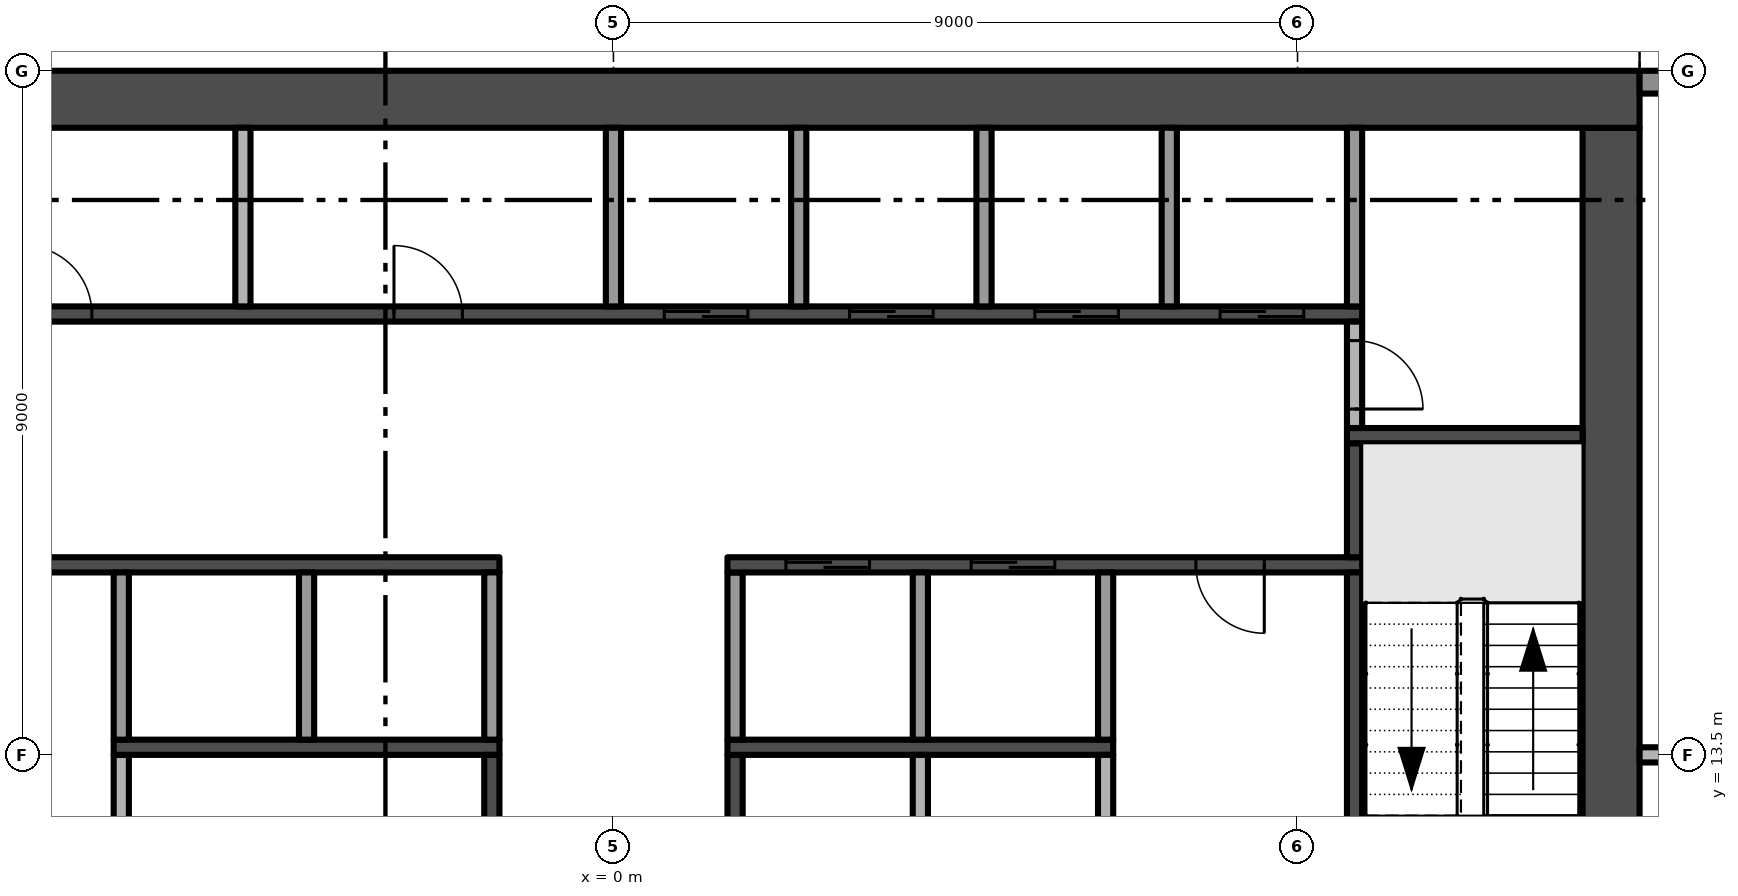
"""IFC4 building model, lengths in metres.
Left out: names, types, materials, properties, quantities, classifications, styles, units other than length and angle.
Written with IfcOpenShell. Run it as: python <this file> out.ifc"""

import sys

from ifc_helpers import new_model, si_unit, direction, frame, frame_2d, origin, place, context, subcontext, project, spatial, rectangle, extrude, element, fill, save


model = new_model("IFC4")
c1 = context("Model", 3, precision=1e-05, world=origin(), true_north=direction((0.0, 1.0)))
c2 = subcontext(c1, "Body", "Model", "MODEL_VIEW")
j1 = project(units=[si_unit("LENGTHUNIT", "METRE"), si_unit("PLANEANGLEUNIT", "RADIAN")], contexts=[c1])
p1 = place(None, origin())
s1 = spatial("IfcSite", under=j1, at=p1, CompositionType="ELEMENT")
p2 = place(p1, origin())
s2 = spatial("IfcBuilding", under=s1, at=p2, CompositionType="ELEMENT")
p3 = place(p2, frame((0.0, 0.0, 136.4)))
s3 = spatial("IfcBuildingStorey", under=s2, at=p3, CompositionType="ELEMENT", Elevation=136.4)
p4 = place(p3, frame((13.125, 5.25, -0.3), z_axis=(0.0, 0.0, 1.0), x_axis=(0.0, 1.0, 0.0)))
e1 = element("IfcWall", 1, at=p4, inside=s3, PredefinedType="SHEAR", context=c2, shape_type="SweptSolid", body=[
    extrude(rectangle(XDim=16.5, YDim=0.75, at=frame_2d((8.25, 0.0))), origin(), (0.0, 0.0, 1.0), 3.8),
])
p5 = place(p4, frame((6.15, 0.0, 0.3)))
e2 = element("IfcOpeningElement", 2, at=p5, cuts=e1, PredefinedType="OPENING", context=c2, shape_type="SweptSolid", body=[
    extrude(rectangle(XDim=1.2, YDim=2.2, at=frame_2d((0.6, 1.1))), frame((0.0, 0.385, 0.0), z_axis=(0.0, -1.0, 0.0), x_axis=(1.0, 0.0, 0.0)), (0.0, 0.0, 1.0), 0.77),
])
p6 = place(p3, frame((13.5, 22.125, -0.3), z_axis=(0.0, 0.0, 1.0), x_axis=(-1.0, 0.0, 0.0)))
e3 = element("IfcWall", 3, at=p6, inside=s3, PredefinedType="SHEAR", context=c2, shape_type="SweptSolid", body=[
    extrude(rectangle(XDim=27.0, YDim=0.75, at=frame_2d((13.5, 0.0))), origin(), (0.0, 0.0, 1.0), 3.8),
])
p7 = place(p3, frame((13.5, 22.35, 0.0), z_axis=(0.0, 0.0, 1.0), x_axis=(1.0, 0.0, 0.0)))
e4 = element("IfcWall", 4, at=p7, inside=s3, PredefinedType="SOLIDWALL", context=c2, shape_type="SweptSolid", body=[
    extrude(rectangle(XDim=3.3, YDim=0.3, at=frame_2d((1.65, 0.0))), origin(), (0.0, 0.0, 1.0), 3.5),
])
p8 = place(p7, frame((2.05, 0.0, 0.45)))
e5 = element("IfcOpeningElement", 5, at=p8, cuts=e4, PredefinedType="OPENING", context=c2, shape_type="SweptSolid", body=[
    extrude(rectangle(XDim=0.95, YDim=2.65, at=frame_2d((0.475, 1.325))), frame((0.0, 0.16, 0.0), z_axis=(0.0, -1.0, 0.0), x_axis=(1.0, 0.0, 0.0)), (0.0, 0.0, 1.0), 0.32),
])
p9 = place(p7, frame((0.7, 0.0, 0.0)))
e6 = element("IfcOpeningElement", 6, at=p9, cuts=e4, PredefinedType="OPENING", context=c2, shape_type="SweptSolid", body=[
    extrude(rectangle(XDim=1.2, YDim=2.4, at=frame_2d((0.6, 1.2))), frame((0.0, 0.16, 0.0), z_axis=(0.0, -1.0, 0.0), x_axis=(1.0, 0.0, 0.0)), (0.0, 0.0, 1.0), 0.32),
])
p10 = place(p3, frame((-1.5, 16.0, 0.0), z_axis=(0.0, 0.0, 1.0), x_axis=(-1.0, 0.0, 0.0)))
e7 = element("IfcWall", 7, at=p10, inside=s3, PredefinedType="SHEAR", context=c2, shape_type="SweptSolid", body=[
    extrude(rectangle(XDim=8.35, YDim=0.2, at=frame_2d((4.175, 0.0))), origin(), (0.0, 0.0, 1.0), 3.5),
])
p11 = place(p10, frame((6.162, 0.0, 0.0)))
e8 = element("IfcOpeningElement", 8, at=p11, cuts=e7, PredefinedType="OPENING", context=c2, shape_type="SweptSolid", body=[
    extrude(rectangle(XDim=0.9, YDim=2.1, at=frame_2d((0.45, 1.05))), frame((0.0, 0.11, 0.0), z_axis=(0.0, -1.0, 0.0), x_axis=(1.0, 0.0, 0.0)), (0.0, 0.0, 1.0), 0.22),
])
p12 = place(p3, frame((-9.85, 19.3, 0.0), z_axis=(0.0, 0.0, 1.0), x_axis=(1.0, 0.0, 0.0)))
e9 = element("IfcWall", 9, at=p12, inside=s3, PredefinedType="SHEAR", context=c2, shape_type="SweptSolid", body=[
    extrude(rectangle(XDim=19.7, YDim=0.2, at=frame_2d((9.85, 0.0))), origin(), (0.0, 0.0, 1.0), 3.5),
])
p13 = place(p12, frame((10.519, 0.0, 0.0)))
e10 = element("IfcOpeningElement", 10, at=p13, cuts=e9, PredefinedType="OPENING", context=c2, shape_type="SweptSolid", body=[
    extrude(rectangle(XDim=1.1, YDim=2.1, at=frame_2d((0.55, 1.05))), frame((0.0, 0.11, 0.0), z_axis=(0.0, -1.0, 0.0), x_axis=(1.0, 0.0, 0.0)), (0.0, 0.0, 1.0), 0.22),
])
p14 = place(p12, frame((12.956, 0.0, 0.0)))
e11 = element("IfcOpeningElement", 11, at=p14, cuts=e9, PredefinedType="OPENING", context=c2, shape_type="SweptSolid", body=[
    extrude(rectangle(XDim=1.1, YDim=2.1, at=frame_2d((0.55, 1.05))), frame((0.0, 0.11, 0.0), z_axis=(0.0, -1.0, 0.0), x_axis=(1.0, 0.0, 0.0)), (0.0, 0.0, 1.0), 0.22),
])
p15 = place(p12, frame((15.394, 0.0, 0.0)))
e12 = element("IfcOpeningElement", 12, at=p15, cuts=e9, PredefinedType="OPENING", context=c2, shape_type="SweptSolid", body=[
    extrude(rectangle(XDim=1.1, YDim=2.1, at=frame_2d((0.55, 1.05))), frame((0.0, 0.11, 0.0), z_axis=(0.0, -1.0, 0.0), x_axis=(1.0, 0.0, 0.0)), (0.0, 0.0, 1.0), 0.22),
])
p16 = place(p12, frame((17.831, 0.0, 0.0)))
e13 = element("IfcOpeningElement", 13, at=p16, cuts=e9, PredefinedType="OPENING", context=c2, shape_type="SweptSolid", body=[
    extrude(rectangle(XDim=1.1, YDim=2.1, at=frame_2d((0.55, 1.05))), frame((0.0, 0.11, 0.0), z_axis=(0.0, -1.0, 0.0), x_axis=(1.0, 0.0, 0.0)), (0.0, 0.0, 1.0), 0.22),
])
p17 = place(p12, frame((2.087, 0.0, 0.0)))
e14 = element("IfcOpeningElement", 14, at=p17, cuts=e9, PredefinedType="OPENING", context=c2, shape_type="SweptSolid", body=[
    extrude(rectangle(XDim=0.9, YDim=2.1, at=frame_2d((0.45, 1.05))), frame((0.0, 0.11, 0.0), z_axis=(0.0, -1.0, 0.0), x_axis=(1.0, 0.0, 0.0)), (0.0, 0.0, 1.0), 0.22),
])
p18 = place(p12, frame((6.963, 0.0, 0.0)))
e15 = element("IfcOpeningElement", 15, at=p18, cuts=e9, PredefinedType="OPENING", context=c2, shape_type="SweptSolid", body=[
    extrude(rectangle(XDim=0.9, YDim=2.1, at=frame_2d((0.45, 1.05))), frame((0.0, 0.11, 0.0), z_axis=(0.0, -1.0, 0.0), x_axis=(1.0, 0.0, 0.0)), (0.0, 0.0, 1.0), 0.22),
])
p19 = place(p3, frame((-6.475, 8.15, 0.0), z_axis=(0.0, 0.0, 1.0), x_axis=(0.0, 1.0, 0.0)))
e16 = element("IfcWall", 16, at=p19, inside=s3, PredefinedType="PARTITIONING", context=c2, shape_type="SweptSolid", body=[
    extrude(rectangle(XDim=5.35, YDim=0.2, at=frame_2d((2.675, 0.0))), origin(), (0.0, 0.0, 1.0), 3.5),
])
p20 = place(p3, frame((-6.575, 13.6, 0.0), z_axis=(0.0, 0.0, 1.0), x_axis=(1.0, 0.0, 0.0)))
e17 = element("IfcWall", 17, at=p20, inside=s3, PredefinedType="SHEAR", context=c2, shape_type="SweptSolid", body=[
    extrude(rectangle(XDim=5.075, YDim=0.2, at=frame_2d((2.538, 0.0))), origin(), (0.0, 0.0, 1.0), 3.5),
])
p21 = place(p3, frame((-6.475, 13.7, 0.0), z_axis=(0.0, 0.0, 1.0), x_axis=(0.0, 1.0, 0.0)))
e18 = element("IfcWall", 18, at=p21, inside=s3, PredefinedType="PARTITIONING", context=c2, shape_type="SweptSolid", body=[
    extrude(rectangle(XDim=2.2, YDim=0.2, at=frame_2d((1.1, 0.0))), origin(), (0.0, 0.0, 1.0), 3.5),
])
p22 = place(p3, frame((-4.875, 19.4, 0.0), z_axis=(0.0, 0.0, 1.0), x_axis=(0.0, 1.0, 0.0)))
e19 = element("IfcWall", 19, at=p22, inside=s3, PredefinedType="PARTITIONING", context=c2, shape_type="SweptSolid", body=[
    extrude(rectangle(XDim=2.35, YDim=0.2, at=frame_2d((1.175, 0.0))), origin(), (0.0, 0.0, 1.0), 3.5),
])
p23 = place(p3, frame((-4.037, 13.7, 0.0), z_axis=(0.0, 0.0, 1.0), x_axis=(0.0, 1.0, 0.0)))
e20 = element("IfcWall", 20, at=p23, inside=s3, PredefinedType="PARTITIONING", context=c2, shape_type="SweptSolid", body=[
    extrude(rectangle(XDim=2.2, YDim=0.2, at=frame_2d((1.1, 0.0))), origin(), (0.0, 0.0, 1.0), 3.5),
])
p24 = place(p3, frame((-1.6, 8.15, 0.0), z_axis=(0.0, 0.0, 1.0), x_axis=(0.0, 1.0, 0.0)))
e21 = element("IfcWall", 21, at=p24, inside=s3, PredefinedType="SHEAR", context=c2, shape_type="SweptSolid", body=[
    extrude(rectangle(XDim=5.35, YDim=0.2, at=frame_2d((2.675, 0.0))), origin(), (0.0, 0.0, 1.0), 3.5),
])
p25 = place(p24, frame((2.225, 0.0, 0.0)))
e22 = element("IfcOpeningElement", 22, at=p25, cuts=e21, PredefinedType="OPENING", context=c2, shape_type="SweptSolid", body=[
    extrude(rectangle(XDim=0.9, YDim=2.1, at=frame_2d((0.45, 1.05))), frame((0.0, 0.11, 0.0), z_axis=(0.0, -1.0, 0.0), x_axis=(1.0, 0.0, 0.0)), (0.0, 0.0, 1.0), 0.22),
])
p26 = place(p3, frame((-1.6, 13.7, 0.0), z_axis=(0.0, 0.0, 1.0), x_axis=(0.0, 1.0, 0.0)))
e23 = element("IfcWall", 23, at=p26, inside=s3, PredefinedType="PARTITIONING", context=c2, shape_type="SweptSolid", body=[
    extrude(rectangle(XDim=2.2, YDim=0.2, at=frame_2d((1.1, 0.0))), origin(), (0.0, 0.0, 1.0), 3.5),
])
p27 = place(p3, frame((0.0, 19.4, 0.0), z_axis=(0.0, 0.0, 1.0), x_axis=(0.0, 1.0, 0.0)))
e24 = element("IfcWall", 24, at=p27, inside=s3, PredefinedType="PARTITIONING", context=c2, shape_type="SweptSolid", body=[
    extrude(rectangle(XDim=2.35, YDim=0.2, at=frame_2d((1.175, 0.0))), origin(), (0.0, 0.0, 1.0), 3.5),
])
p28 = place(p3, frame((1.6, 13.5, 0.0), z_axis=(0.0, 0.0, 1.0), x_axis=(0.0, -1.0, 0.0)))
e25 = element("IfcWall", 25, at=p28, inside=s3, PredefinedType="SHEAR", context=c2, shape_type="SweptSolid", body=[
    extrude(rectangle(XDim=3.5, YDim=0.2, at=frame_2d((1.75, 0.0))), origin(), (0.0, 0.0, 1.0), 3.5),
])
p29 = place(p28, frame((1.3, 0.0, 0.0)))
e26 = element("IfcOpeningElement", 26, at=p29, cuts=e25, PredefinedType="OPENING", context=c2, shape_type="SweptSolid", body=[
    extrude(rectangle(XDim=0.9, YDim=2.1, at=frame_2d((0.45, 1.05))), frame((0.0, 0.11, 0.0), z_axis=(0.0, -1.0, 0.0), x_axis=(1.0, 0.0, 0.0)), (0.0, 0.0, 1.0), 0.22),
])
p30 = place(p3, frame((1.5, 13.6, 0.0), z_axis=(0.0, 0.0, 1.0), x_axis=(1.0, 0.0, 0.0)))
e27 = element("IfcWall", 27, at=p30, inside=s3, PredefinedType="SHEAR", context=c2, shape_type="SweptSolid", body=[
    extrude(rectangle(XDim=5.075, YDim=0.2, at=frame_2d((2.538, 0.0))), origin(), (0.0, 0.0, 1.0), 3.5),
])
p31 = place(p3, frame((1.6, 13.7, 0.0), z_axis=(0.0, 0.0, 1.0), x_axis=(0.0, 1.0, 0.0)))
e28 = element("IfcWall", 28, at=p31, inside=s3, PredefinedType="PARTITIONING", context=c2, shape_type="SweptSolid", body=[
    extrude(rectangle(XDim=2.2, YDim=0.2, at=frame_2d((1.1, 0.0))), origin(), (0.0, 0.0, 1.0), 3.5),
])
p32 = place(p3, frame((9.85, 16.0, 0.0), z_axis=(0.0, 0.0, 1.0), x_axis=(-1.0, 0.0, 0.0)))
e29 = element("IfcWall", 29, at=p32, inside=s3, PredefinedType="SHEAR", context=c2, shape_type="SweptSolid", body=[
    extrude(rectangle(XDim=8.35, YDim=0.2, at=frame_2d((4.175, 0.0))), origin(), (0.0, 0.0, 1.0), 3.5),
])
p33 = place(p32, frame((6.481, 0.0, 0.0)))
e30 = element("IfcOpeningElement", 30, at=p33, cuts=e29, PredefinedType="OPENING", context=c2, shape_type="SweptSolid", body=[
    extrude(rectangle(XDim=1.1, YDim=2.1, at=frame_2d((0.55, 1.05))), frame((0.0, 0.11, 0.0), z_axis=(0.0, -1.0, 0.0), x_axis=(1.0, 0.0, 0.0)), (0.0, 0.0, 1.0), 0.22),
])
p34 = place(p32, frame((4.044, 0.0, 0.0)))
e31 = element("IfcOpeningElement", 31, at=p34, cuts=e29, PredefinedType="OPENING", context=c2, shape_type="SweptSolid", body=[
    extrude(rectangle(XDim=1.1, YDim=2.1, at=frame_2d((0.55, 1.05))), frame((0.0, 0.11, 0.0), z_axis=(0.0, -1.0, 0.0), x_axis=(1.0, 0.0, 0.0)), (0.0, 0.0, 1.0), 0.22),
])
p35 = place(p32, frame((1.288, 0.0, 0.0)))
e32 = element("IfcOpeningElement", 32, at=p35, cuts=e29, PredefinedType="OPENING", context=c2, shape_type="SweptSolid", body=[
    extrude(rectangle(XDim=0.9, YDim=2.1, at=frame_2d((0.45, 1.05))), frame((0.0, 0.11, 0.0), z_axis=(0.0, -1.0, 0.0), x_axis=(1.0, 0.0, 0.0)), (0.0, 0.0, 1.0), 0.22),
])
p36 = place(p3, frame((2.438, 19.4, 0.0), z_axis=(0.0, 0.0, 1.0), x_axis=(0.0, 1.0, 0.0)))
e33 = element("IfcWall", 33, at=p36, inside=s3, PredefinedType="PARTITIONING", context=c2, shape_type="SweptSolid", body=[
    extrude(rectangle(XDim=2.35, YDim=0.2, at=frame_2d((1.175, 0.0))), origin(), (0.0, 0.0, 1.0), 3.5),
])
p37 = place(p3, frame((4.037, 10.0, 0.0), z_axis=(0.0, 0.0, 1.0), x_axis=(0.0, 1.0, 0.0)))
e34 = element("IfcWall", 34, at=p37, inside=s3, PredefinedType="PARTITIONING", context=c2, shape_type="SweptSolid", body=[
    extrude(rectangle(XDim=3.5, YDim=0.2, at=frame_2d((1.75, 0.0))), origin(), (0.0, 0.0, 1.0), 3.5),
])
p38 = place(p3, frame((4.037, 13.7, 0.0), z_axis=(0.0, 0.0, 1.0), x_axis=(0.0, 1.0, 0.0)))
e35 = element("IfcWall", 35, at=p38, inside=s3, PredefinedType="PARTITIONING", context=c2, shape_type="SweptSolid", body=[
    extrude(rectangle(XDim=2.2, YDim=0.2, at=frame_2d((1.1, 0.0))), origin(), (0.0, 0.0, 1.0), 3.5),
])
p39 = place(p3, frame((4.875, 19.4, 0.0), z_axis=(0.0, 0.0, 1.0), x_axis=(0.0, 1.0, 0.0)))
e36 = element("IfcWall", 36, at=p39, inside=s3, PredefinedType="PARTITIONING", context=c2, shape_type="SweptSolid", body=[
    extrude(rectangle(XDim=2.35, YDim=0.2, at=frame_2d((1.175, 0.0))), origin(), (0.0, 0.0, 1.0), 3.5),
])
p40 = place(p3, frame((6.475, 12.3, 0.0), z_axis=(0.0, 0.0, 1.0), x_axis=(0.0, 1.0, 0.0)))
e37 = element("IfcWall", 37, at=p40, inside=s3, PredefinedType="PARTITIONING", context=c2, shape_type="SweptSolid", body=[
    extrude(rectangle(XDim=1.2, YDim=0.2, at=frame_2d((0.6, 0.0))), origin(), (0.0, 0.0, 1.0), 3.5),
])
p41 = place(p3, frame((6.475, 13.7, 0.0), z_axis=(0.0, 0.0, 1.0), x_axis=(0.0, 1.0, 0.0)))
e38 = element("IfcWall", 38, at=p41, inside=s3, PredefinedType="PARTITIONING", context=c2, shape_type="SweptSolid", body=[
    extrude(rectangle(XDim=2.2, YDim=0.2, at=frame_2d((1.1, 0.0))), origin(), (0.0, 0.0, 1.0), 3.5),
])
p42 = place(p3, frame((7.312, 19.4, 0.0), z_axis=(0.0, 0.0, 1.0), x_axis=(0.0, 1.0, 0.0)))
e39 = element("IfcWall", 39, at=p42, inside=s3, PredefinedType="PARTITIONING", context=c2, shape_type="SweptSolid", body=[
    extrude(rectangle(XDim=2.35, YDim=0.2, at=frame_2d((1.175, 0.0))), origin(), (0.0, 0.0, 1.0), 3.5),
])
p43 = place(p3, frame((9.75, 12.3, 0.0), z_axis=(0.0, 0.0, 1.0), x_axis=(0.0, 1.0, 0.0)))
e40 = element("IfcWall", 40, at=p43, inside=s3, PredefinedType="SHEAR", context=c2, shape_type="SweptSolid", body=[
    extrude(rectangle(XDim=3.6, YDim=0.2, at=frame_2d((1.8, 0.0))), origin(), (0.0, 0.0, 1.0), 3.5),
])
p44 = place(p3, frame((9.75, 16.1, 0.0), z_axis=(0.0, 0.0, 1.0), x_axis=(0.0, 1.0, 0.0)))
e41 = element("IfcWall", 41, at=p44, inside=s3, PredefinedType="SHEAR", context=c2, shape_type="SweptSolid", body=[
    extrude(rectangle(XDim=1.5, YDim=0.2, at=frame_2d((0.75, 0.0))), origin(), (0.0, 0.0, 1.0), 3.5),
])
p45 = place(p3, frame((9.65, 17.7, 0.0), z_axis=(0.0, 0.0, 1.0), x_axis=(1.0, 0.0, 0.0)))
e42 = element("IfcWall", 42, at=p45, inside=s3, PredefinedType="SHEAR", context=c2, shape_type="SweptSolid", body=[
    extrude(rectangle(XDim=3.1, YDim=0.2, at=frame_2d((1.55, 0.0))), origin(), (0.0, 0.0, 1.0), 3.5),
])
p46 = place(p3, frame((9.75, 19.2, 0.0), z_axis=(0.0, 0.0, 1.0), x_axis=(0.0, -1.0, 0.0)))
e43 = element("IfcWall", 43, at=p46, inside=s3, PredefinedType="PARTITIONING", context=c2, shape_type="SweptSolid", body=[
    extrude(rectangle(XDim=1.4, YDim=0.2, at=frame_2d((0.7, 0.0))), origin(), (0.0, 0.0, 1.0), 3.5),
])
p47 = place(p46, frame((0.25, 0.0, 0.0)))
e44 = element("IfcOpeningElement", 44, at=p47, cuts=e43, PredefinedType="OPENING", context=c2, shape_type="SweptSolid", body=[
    extrude(rectangle(XDim=0.9, YDim=2.1, at=frame_2d((0.45, 1.05))), frame((0.0, 0.11, 0.0), z_axis=(0.0, -1.0, 0.0), x_axis=(1.0, 0.0, 0.0)), (0.0, 0.0, 1.0), 0.22),
])
p48 = place(p3, frame((9.75, 19.4, 0.0), z_axis=(0.0, 0.0, 1.0), x_axis=(0.0, 1.0, 0.0)))
e45 = element("IfcWall", 45, at=p48, inside=s3, PredefinedType="PARTITIONING", context=c2, shape_type="SweptSolid", body=[
    extrude(rectangle(XDim=2.35, YDim=0.2, at=frame_2d((1.175, 0.0))), origin(), (0.0, 0.0, 1.0), 3.5),
])
p49 = place(p3, frame((13.5, 13.5, 0.0), z_axis=(0.0, 0.0, 1.0), x_axis=(1.0, 0.0, 0.0)))
e46 = element("IfcWall", 46, at=p49, inside=s3, PredefinedType="PARTITIONING", context=c2, shape_type="SweptSolid", body=[
    extrude(rectangle(XDim=3.85, YDim=0.2, at=frame_2d((1.925, 0.0))), origin(), (0.0, 0.0, 1.0), 3.5),
])
p50 = place(p49, frame((1.6, 0.0, 0.0)))
e47 = element("IfcOpeningElement", 47, at=p50, cuts=e46, PredefinedType="OPENING", context=c2, shape_type="SweptSolid", body=[
    extrude(rectangle(XDim=0.9, YDim=2.1, at=frame_2d((0.45, 1.05))), frame((0.0, 0.11, 0.0), z_axis=(0.0, -1.0, 0.0), x_axis=(1.0, 0.0, 0.0)), (0.0, 0.0, 1.0), 0.22),
])
p51 = place(p13, origin())
e48 = element("IfcDoor", 48, at=p51, inside=s3, OperationType="SLIDING_TO_RIGHT", PredefinedType="DOOR", context=c2, shape_type="SweptSolid", body=[
    extrude(rectangle(XDim=1.1, YDim=2.1, at=frame_2d((0.55, 1.05))), frame((0.0, 0.025, 0.0), z_axis=(0.0, -1.0, 0.0), x_axis=(1.0, 0.0, 0.0)), (0.0, 0.0, 1.0), 0.05),
])
fill(e10, e48)
p52 = place(p14, origin())
e49 = element("IfcDoor", 49, at=p52, inside=s3, OperationType="SLIDING_TO_RIGHT", PredefinedType="DOOR", context=c2, shape_type="SweptSolid", body=[
    extrude(rectangle(XDim=1.1, YDim=2.1, at=frame_2d((0.55, 1.05))), frame((0.0, 0.025, 0.0), z_axis=(0.0, -1.0, 0.0), x_axis=(1.0, 0.0, 0.0)), (0.0, 0.0, 1.0), 0.05),
])
fill(e11, e49)
p53 = place(p15, origin())
e50 = element("IfcDoor", 50, at=p53, inside=s3, OperationType="SLIDING_TO_RIGHT", PredefinedType="DOOR", context=c2, shape_type="SweptSolid", body=[
    extrude(rectangle(XDim=1.1, YDim=2.1, at=frame_2d((0.55, 1.05))), frame((0.0, 0.025, 0.0), z_axis=(0.0, -1.0, 0.0), x_axis=(1.0, 0.0, 0.0)), (0.0, 0.0, 1.0), 0.05),
])
fill(e12, e50)
p54 = place(p16, origin())
e51 = element("IfcDoor", 51, at=p54, inside=s3, OperationType="SLIDING_TO_RIGHT", PredefinedType="DOOR", context=c2, shape_type="SweptSolid", body=[
    extrude(rectangle(XDim=1.1, YDim=2.1, at=frame_2d((0.55, 1.05))), frame((0.0, 0.025, 0.0), z_axis=(0.0, -1.0, 0.0), x_axis=(1.0, 0.0, 0.0)), (0.0, 0.0, 1.0), 0.05),
])
fill(e13, e51)
p55 = place(p33, origin())
e52 = element("IfcDoor", 52, at=p55, inside=s3, OperationType="SLIDING_TO_RIGHT", PredefinedType="DOOR", context=c2, shape_type="SweptSolid", body=[
    extrude(rectangle(XDim=1.1, YDim=2.1, at=frame_2d((0.55, 1.05))), frame((0.0, 0.025, 0.0), z_axis=(0.0, -1.0, 0.0), x_axis=(1.0, 0.0, 0.0)), (0.0, 0.0, 1.0), 0.05),
])
fill(e30, e52)
p56 = place(p34, origin())
e53 = element("IfcDoor", 53, at=p56, inside=s3, OperationType="SLIDING_TO_RIGHT", PredefinedType="DOOR", context=c2, shape_type="SweptSolid", body=[
    extrude(rectangle(XDim=1.1, YDim=2.1, at=frame_2d((0.55, 1.05))), frame((0.0, 0.025, 0.0), z_axis=(0.0, -1.0, 0.0), x_axis=(1.0, 0.0, 0.0)), (0.0, 0.0, 1.0), 0.05),
])
fill(e31, e53)
p57 = place(p35, origin())
e54 = element("IfcDoor", 54, at=p57, inside=s3, OperationType="SINGLE_SWING_LEFT", PredefinedType="DOOR", context=c2, shape_type="SweptSolid", body=[
    extrude(rectangle(XDim=0.9, YDim=2.1, at=frame_2d((0.45, 1.05))), frame((0.0, 0.025, 0.0), z_axis=(0.0, -1.0, 0.0), x_axis=(1.0, 0.0, 0.0)), (0.0, 0.0, 1.0), 0.05),
])
fill(e32, e54)
p58 = place(p47, origin())
e55 = element("IfcDoor", 55, at=p58, inside=s3, OperationType="SINGLE_SWING_RIGHT", PredefinedType="DOOR", context=c2, shape_type="SweptSolid", body=[
    extrude(rectangle(XDim=0.9, YDim=2.1, at=frame_2d((0.45, 1.05))), frame((0.0, 0.025, 0.0), z_axis=(0.0, -1.0, 0.0), x_axis=(1.0, 0.0, 0.0)), (0.0, 0.0, 1.0), 0.05),
])
fill(e44, e55)
p59 = place(p17, origin())
e56 = element("IfcDoor", 56, at=p59, inside=s3, OperationType="SINGLE_SWING_LEFT", PredefinedType="DOOR", context=c2, shape_type="SweptSolid", body=[
    extrude(rectangle(XDim=0.9, YDim=2.1, at=frame_2d((0.45, 1.05))), frame((0.0, 0.025, 0.0), z_axis=(0.0, -1.0, 0.0), x_axis=(1.0, 0.0, 0.0)), (0.0, 0.0, 1.0), 0.05),
])
fill(e14, e56)
p60 = place(p18, origin())
e57 = element("IfcDoor", 57, at=p60, inside=s3, OperationType="SINGLE_SWING_LEFT", PredefinedType="DOOR", context=c2, shape_type="SweptSolid", body=[
    extrude(rectangle(XDim=0.9, YDim=2.1, at=frame_2d((0.45, 1.05))), frame((0.0, 0.025, 0.0), z_axis=(0.0, -1.0, 0.0), x_axis=(1.0, 0.0, 0.0)), (0.0, 0.0, 1.0), 0.05),
])
fill(e15, e57)
save(model, sys.argv[1])
